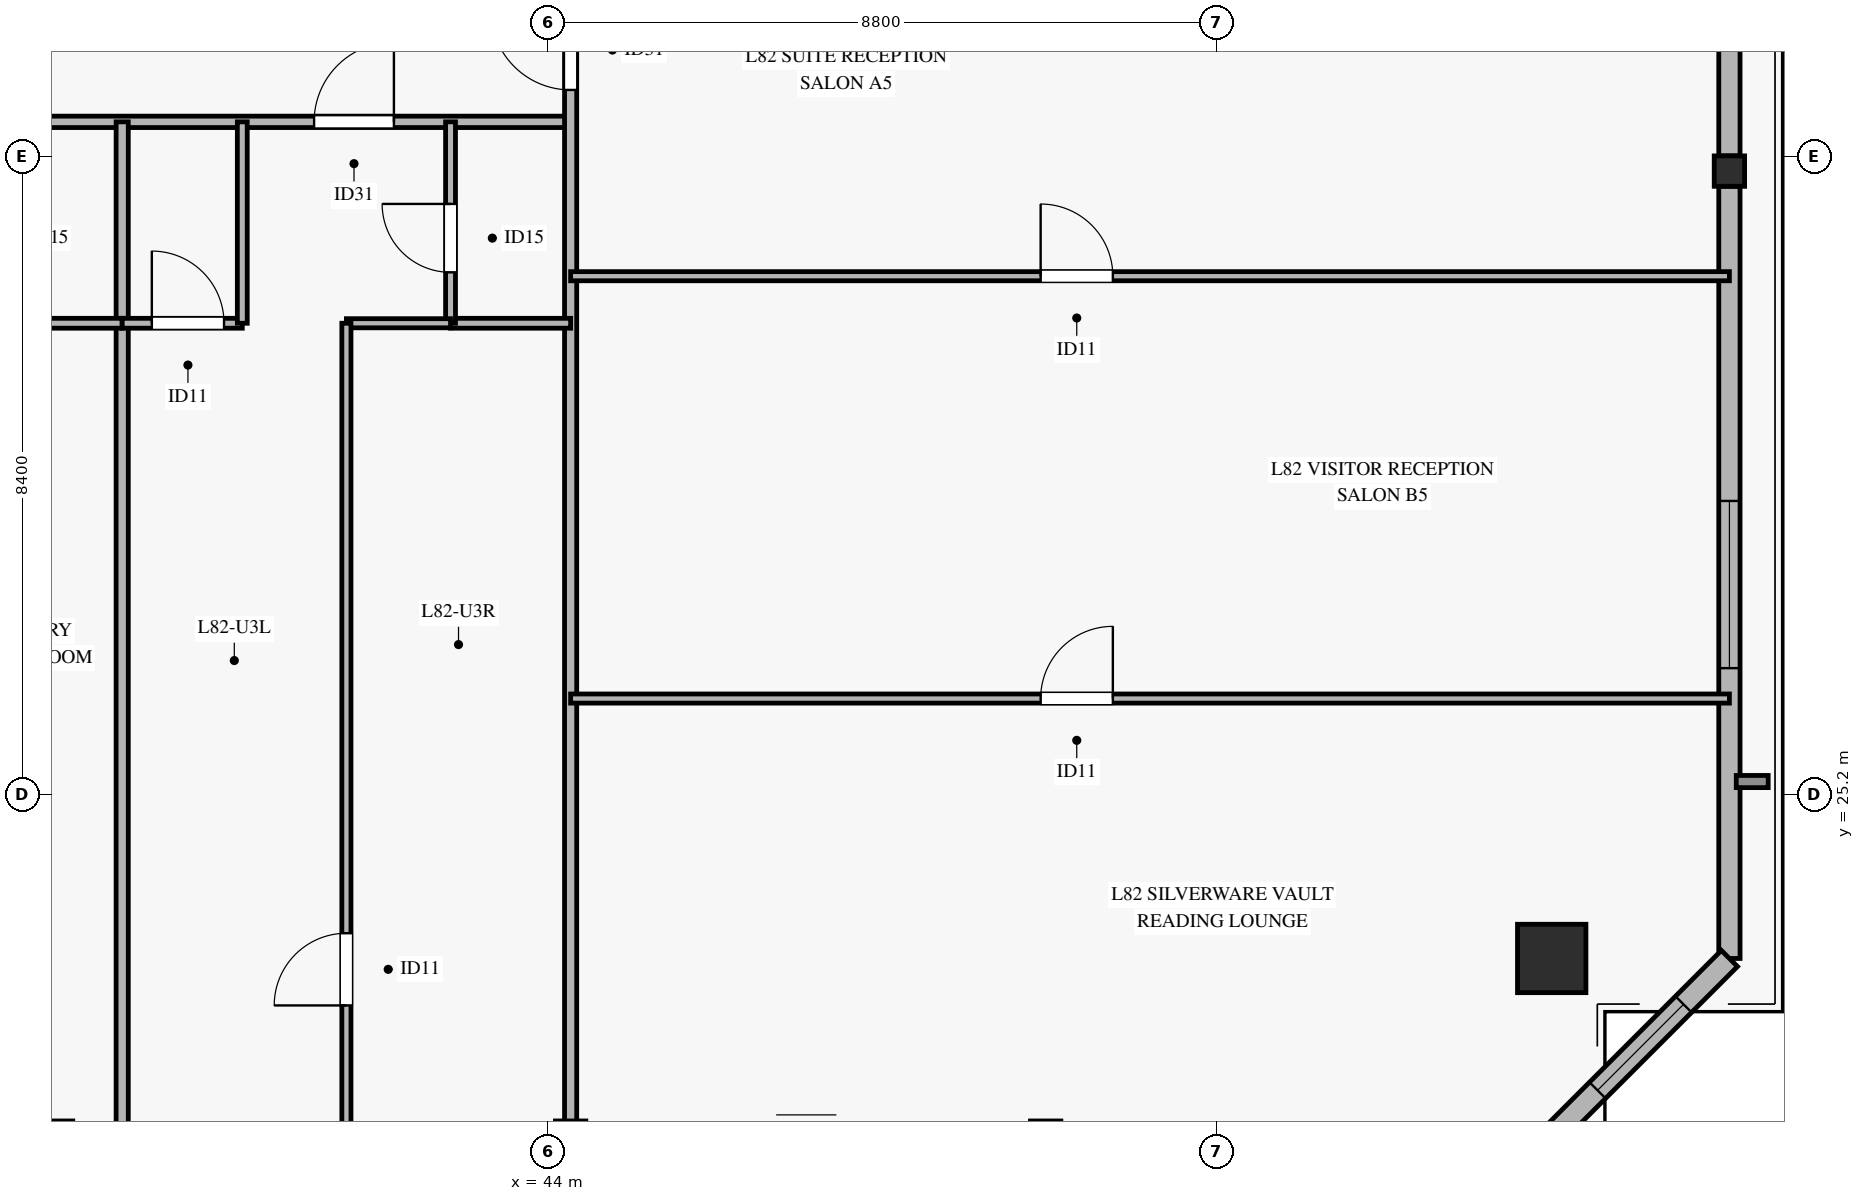
"""IFC4 building model, lengths in metres.
Left out: names, types, materials, properties, quantities, classifications, styles, units other than length and angle.
Written with IfcOpenShell. Run it as: python <this file> out.ifc"""

import sys

from ifc_helpers import new_model, si_unit, direction, frame, frame_2d, origin, origin_2d, place, context, subcontext, project, spatial, rectangle, hollow_rectangle, extrude, source, transform, mapped, element, fill, save


model = new_model("IFC4")
c1 = context("Model", 3, precision=1e-05, world=origin(), true_north=direction((0.0, 1.0)))
c2 = subcontext(c1, "Body", "Model", "MODEL_VIEW")
j1 = project(units=[si_unit("LENGTHUNIT", "METRE"), si_unit("PLANEANGLEUNIT", "RADIAN")], contexts=[c1])
p1 = place(None, origin())
s1 = spatial("IfcSite", under=j1, at=p1, CompositionType="ELEMENT")
p2 = place(p1, origin())
s2 = spatial("IfcBuilding", under=s1, at=p2, CompositionType="ELEMENT")
p3 = place(p2, frame((0.0, 0.0, 317.6)))
s3 = spatial("IfcBuildingStorey", under=s2, at=p3, CompositionType="ELEMENT", Elevation=317.6)
m1 = source(origin(), c2, "Body", "SweptSolid", [
    extrude(hollow_rectangle(XDim=0.9, YDim=0.9, WallThickness=0.04, at=origin_2d()), origin(), (0.0, 0.0, 1.0), 3.185),
])
p4 = place(p3, frame((57.208, 23.042, 0.0), z_axis=(0.0, 0.0, 1.0), x_axis=(1.0, 0.0, 0.0)))
e1 = element("IfcColumn", 1, at=p4, inside=s3, PredefinedType="COLUMN", context=c2, shape_type="MappedRepresentation", body=[
    mapped(m1, transform((0.0, 0.0, 0.0), x_axis=(1.0, 0.0, 0.0), y_axis=(0.0, 1.0, 0.0), z_axis=(0.0, 0.0, 1.0), scale=1.0)),
])
m2 = source(origin(), c2, "Body", "SweptSolid", [
    extrude(hollow_rectangle(XDim=0.4, YDim=0.4, WallThickness=0.02, at=origin_2d()), origin(), (0.0, 0.0, 1.0), 3.185),
])
p5 = place(p3, frame((59.546, 33.402, 0.0), z_axis=(0.0, 0.0, 1.0), x_axis=(1.0, 0.0, 0.0)))
e2 = element("IfcColumn", 2, at=p5, inside=s3, PredefinedType="COLUMN", context=c2, shape_type="MappedRepresentation", body=[
    mapped(m2, transform((0.0, 0.0, 0.0), x_axis=(1.0, 0.0, 0.0), y_axis=(0.0, 1.0, 0.0), z_axis=(0.0, 0.0, 1.0), scale=1.0)),
])
p6 = place(p3, frame((59.546, 23.042, 0.0), z_axis=(0.0, 0.0, 1.0), x_axis=(0.0, 1.0, 0.0)))
e3 = element("IfcWall", 3, at=p6, inside=s3, PredefinedType="SOLIDWALL", context=c2, shape_type="SweptSolid", body=[
    extrude(rectangle(XDim=10.16, YDim=0.28, at=frame_2d((5.08, 0.0))), origin(), (0.0, 0.0, 1.0), 2.815),
])
p7 = place(p6, frame((3.82, 0.0, 0.45)))
e4 = element("IfcOpeningElement", 4, at=p7, cuts=e3, PredefinedType="OPENING", context=c2, shape_type="SweptSolid", body=[
    extrude(rectangle(XDim=2.2, YDim=2.1, at=frame_2d((1.1, 1.05))), frame((0.0, 0.15, 0.0), z_axis=(0.0, -1.0, 0.0), x_axis=(1.0, 0.0, 0.0)), (0.0, 0.0, 1.0), 0.3),
])
p8 = place(p3, frame((59.546, 33.602, 0.0), z_axis=(0.0, 0.0, 1.0), x_axis=(0.0, 1.0, 0.0)))
e5 = element("IfcWall", 5, at=p8, inside=s3, PredefinedType="SOLIDWALL", context=c2, shape_type="SweptSolid", body=[
    extrude(rectangle(XDim=10.16, YDim=0.28, at=frame_2d((5.08, 0.0))), origin(), (0.0, 0.0, 1.0), 2.815),
])
p9 = place(p8, frame((5.955, 0.0, 0.45)))
e6 = element("IfcOpeningElement", 6, at=p9, cuts=e5, PredefinedType="OPENING", context=c2, shape_type="SweptSolid", body=[
    extrude(rectangle(XDim=2.2, YDim=2.1, at=frame_2d((1.1, 1.05))), frame((0.0, 0.15, 0.0), z_axis=(0.0, -1.0, 0.0), x_axis=(1.0, 0.0, 0.0)), (0.0, 0.0, 1.0), 0.3),
])
p10 = place(p3, frame((57.208, 20.704, 0.0), z_axis=(0.0, 0.0, 1.0), x_axis=(0.707106781187, 0.707106781187, 0.0)))
e7 = element("IfcWall", 7, at=p10, inside=s3, PredefinedType="SOLIDWALL", context=c2, shape_type="SweptSolid", body=[
    extrude(rectangle(XDim=3.306, YDim=0.3, at=frame_2d((1.653, 0.0))), origin(), (0.0, 0.0, 1.0), 2.815),
])
p11 = place(p10, frame((0.853, 0.0, 0.45)))
e8 = element("IfcOpeningElement", 8, at=p11, cuts=e7, PredefinedType="OPENING", context=c2, shape_type="SweptSolid", body=[
    extrude(rectangle(XDim=1.6, YDim=2.0, at=frame_2d((0.8, 1.0))), frame((0.0, 0.16, 0.0), z_axis=(0.0, -1.0, 0.0), x_axis=(1.0, 0.0, 0.0)), (0.0, 0.0, 1.0), 0.32),
])
p12 = place(p3, frame((23.4, 34.05, 0.0), z_axis=(0.0, 0.0, 1.0), x_axis=(1.0, 0.0, 0.0)))
e9 = element("IfcWall", 9, at=p12, inside=s3, PredefinedType="PARTITIONING", context=c2, shape_type="SweptSolid", body=[
    extrude(rectangle(XDim=20.9, YDim=0.15, at=frame_2d((10.45, 0.0))), origin(), (0.0, 0.0, 1.0), 2.47),
])
p13 = place(p12, frame((3.275, 0.0, 0.0)))
e10 = element("IfcOpeningElement", 10, at=p13, cuts=e9, PredefinedType="OPENING", context=c2, shape_type="SweptSolid", body=[
    extrude(rectangle(XDim=1.05, YDim=2.15, at=frame_2d((0.525, 1.075))), frame((0.0, 0.085, 0.0), z_axis=(0.0, -1.0, 0.0), x_axis=(1.0, 0.0, 0.0)), (0.0, 0.0, 1.0), 0.17),
])
p14 = place(p12, frame((10.775, 0.0, 0.0)))
e11 = element("IfcOpeningElement", 11, at=p14, cuts=e9, PredefinedType="OPENING", context=c2, shape_type="SweptSolid", body=[
    extrude(rectangle(XDim=1.05, YDim=2.15, at=frame_2d((0.525, 1.075))), frame((0.0, 0.085, 0.0), z_axis=(0.0, -1.0, 0.0), x_axis=(1.0, 0.0, 0.0)), (0.0, 0.0, 1.0), 0.17),
])
p15 = place(p12, frame((17.525, 0.0, 0.0)))
e12 = element("IfcOpeningElement", 12, at=p15, cuts=e9, PredefinedType="OPENING", context=c2, shape_type="SweptSolid", body=[
    extrude(rectangle(XDim=1.05, YDim=2.15, at=frame_2d((0.525, 1.075))), frame((0.0, 0.085, 0.0), z_axis=(0.0, -1.0, 0.0), x_axis=(1.0, 0.0, 0.0)), (0.0, 0.0, 1.0), 0.17),
])
p16 = place(p3, frame((38.4, 20.704, 0.0), z_axis=(0.0, 0.0, 1.0), x_axis=(0.0, 1.0, 0.0)))
e13 = element("IfcWall", 13, at=p16, inside=s3, PredefinedType="PARTITIONING", context=c2, shape_type="SweptSolid", body=[
    extrude(rectangle(XDim=13.346, YDim=0.16, at=frame_2d((6.673, 0.0))), origin(), (0.0, 0.0, 1.0), 2.77),
])
p17 = place(p3, frame((44.3, 20.704, 0.0), z_axis=(0.0, 0.0, 1.0), x_axis=(0.0, 1.0, 0.0)))
e14 = element("IfcWall", 14, at=p17, inside=s3, PredefinedType="PARTITIONING", context=c2, shape_type="SweptSolid", body=[
    extrude(rectangle(XDim=16.746, YDim=0.16, at=frame_2d((8.373, 0.0))), origin(), (0.0, 0.0, 1.0), 2.47),
])
p18 = place(p17, frame((13.766, 0.0, 0.0)))
e15 = element("IfcOpeningElement", 15, at=p18, cuts=e14, PredefinedType="OPENING", context=c2, shape_type="SweptSolid", body=[
    extrude(rectangle(XDim=1.05, YDim=2.15, at=frame_2d((0.525, 1.075))), frame((0.0, 0.09, 0.0), z_axis=(0.0, -1.0, 0.0), x_axis=(1.0, 0.0, 0.0)), (0.0, 0.0, 1.0), 0.18),
])
p19 = place(p3, frame((36.46, 31.4, 0.0), z_axis=(0.0, 0.0, 1.0), x_axis=(1.0, 0.0, 0.0)))
e16 = element("IfcWall", 16, at=p19, inside=s3, PredefinedType="PARTITIONING", context=c2, shape_type="SweptSolid", body=[
    extrude(rectangle(XDim=1.94, YDim=0.13, at=frame_2d((0.97, 0.0))), origin(), (0.0, 0.0, 1.0), 2.47),
])
p20 = place(p3, frame((38.4, 31.4, 0.0), z_axis=(0.0, 0.0, 1.0), x_axis=(1.0, 0.0, 0.0)))
e17 = element("IfcWall", 17, at=p20, inside=s3, PredefinedType="PARTITIONING", context=c2, shape_type="SweptSolid", body=[
    extrude(rectangle(XDim=1.58, YDim=0.13, at=frame_2d((0.79, 0.0))), origin(), (0.0, 0.0, 1.0), 3.185),
])
p21 = place(p20, frame((0.39, 0.0, 0.0)))
e18 = element("IfcOpeningElement", 18, at=p21, cuts=e17, PredefinedType="OPENING", context=c2, shape_type="SweptSolid", body=[
    extrude(rectangle(XDim=0.95, YDim=2.1, at=frame_2d((0.475, 1.05))), frame((0.0, 0.075, 0.0), z_axis=(0.0, -1.0, 0.0), x_axis=(1.0, 0.0, 0.0)), (0.0, 0.0, 1.0), 0.15),
])
p22 = place(p3, frame((39.98, 31.4, 0.0), z_axis=(0.0, 0.0, 1.0), x_axis=(0.0, 1.0, 0.0)))
e19 = element("IfcWall", 19, at=p22, inside=s3, PredefinedType="PARTITIONING", context=c2, shape_type="SweptSolid", body=[
    extrude(rectangle(XDim=2.65, YDim=0.13, at=frame_2d((1.325, 0.0))), origin(), (0.0, 0.0, 1.0), 2.77),
])
p23 = place(p3, frame((42.72, 31.4, 0.0), z_axis=(0.0, 0.0, 1.0), x_axis=(1.0, 0.0, 0.0)))
e20 = element("IfcWall", 20, at=p23, inside=s3, PredefinedType="PARTITIONING", context=c2, shape_type="SweptSolid", body=[
    extrude(rectangle(XDim=1.58, YDim=0.13, at=frame_2d((0.79, 0.0))), origin(), (0.0, 0.0, 1.0), 2.47),
])
p24 = place(p3, frame((42.72, 31.4, 0.0), z_axis=(0.0, 0.0, 1.0), x_axis=(0.0, 1.0, 0.0)))
e21 = element("IfcWall", 21, at=p24, inside=s3, PredefinedType="PARTITIONING", context=c2, shape_type="SweptSolid", body=[
    extrude(rectangle(XDim=2.65, YDim=0.13, at=frame_2d((1.325, 0.0))), origin(), (0.0, 0.0, 1.0), 2.77),
])
p25 = place(p24, frame((0.67, 0.0, 0.0)))
e22 = element("IfcOpeningElement", 22, at=p25, cuts=e21, PredefinedType="OPENING", context=c2, shape_type="SweptSolid", body=[
    extrude(rectangle(XDim=0.9, YDim=2.1, at=frame_2d((0.45, 1.05))), frame((0.0, 0.075, 0.0), z_axis=(0.0, -1.0, 0.0), x_axis=(1.0, 0.0, 0.0)), (0.0, 0.0, 1.0), 0.15),
])
p26 = place(p3, frame((41.35, 31.4, 0.0), z_axis=(0.0, 0.0, 1.0), x_axis=(1.0, 0.0, 0.0)))
e23 = element("IfcWall", 23, at=p26, inside=s3, PredefinedType="PARTITIONING", context=c2, shape_type="SweptSolid", body=[
    extrude(rectangle(XDim=1.37, YDim=0.12, at=frame_2d((0.685, 0.0))), origin(), (0.0, 0.0, 1.0), 3.185),
])
p27 = place(p3, frame((41.35, 20.704, 0.0), z_axis=(0.0, 0.0, 1.0), x_axis=(0.0, 1.0, 0.0)))
e24 = element("IfcWall", 24, at=p27, inside=s3, PredefinedType="PARTITIONING", context=c2, shape_type="SweptSolid", body=[
    extrude(rectangle(XDim=10.696, YDim=0.12, at=frame_2d((5.348, 0.0))), origin(), (0.0, 0.0, 1.0), 2.77),
])
p28 = place(p27, frame((1.72, 0.0, 0.0)))
e25 = element("IfcOpeningElement", 25, at=p28, cuts=e24, PredefinedType="OPENING", context=c2, shape_type="SweptSolid", body=[
    extrude(rectangle(XDim=0.95, YDim=2.1, at=frame_2d((0.475, 1.05))), frame((0.0, 0.07, 0.0), z_axis=(0.0, -1.0, 0.0), x_axis=(1.0, 0.0, 0.0)), (0.0, 0.0, 1.0), 0.14),
])
p29 = place(p3, frame((44.3, 26.462, 0.0), z_axis=(0.0, 0.0, 1.0), x_axis=(1.0, 0.0, 0.0)))
e26 = element("IfcWall", 26, at=p29, inside=s3, PredefinedType="PARTITIONING", context=c2, shape_type="SweptSolid", body=[
    extrude(rectangle(XDim=15.246, YDim=0.12, at=frame_2d((7.623, 0.0))), origin(), (0.0, 0.0, 1.0), 2.47),
])
p30 = place(p29, frame((6.184, 0.0, 0.0)))
e27 = element("IfcOpeningElement", 27, at=p30, cuts=e26, PredefinedType="OPENING", context=c2, shape_type="SweptSolid", body=[
    extrude(rectangle(XDim=0.95, YDim=2.1, at=frame_2d((0.475, 1.05))), frame((0.0, 0.07, 0.0), z_axis=(0.0, -1.0, 0.0), x_axis=(1.0, 0.0, 0.0)), (0.0, 0.0, 1.0), 0.14),
])
p31 = place(p3, frame((44.3, 32.019, 0.0), z_axis=(0.0, 0.0, 1.0), x_axis=(1.0, 0.0, 0.0)))
e28 = element("IfcWall", 28, at=p31, inside=s3, PredefinedType="PARTITIONING", context=c2, shape_type="SweptSolid", body=[
    extrude(rectangle(XDim=15.246, YDim=0.12, at=frame_2d((7.623, 0.0))), origin(), (0.0, 0.0, 1.0), 2.47),
])
p32 = place(p31, frame((6.184, 0.0, 0.0)))
e29 = element("IfcOpeningElement", 29, at=p32, cuts=e28, PredefinedType="OPENING", context=c2, shape_type="SweptSolid", body=[
    extrude(rectangle(XDim=0.95, YDim=2.1, at=frame_2d((0.475, 1.05))), frame((0.0, 0.07, 0.0), z_axis=(0.0, -1.0, 0.0), x_axis=(1.0, 0.0, 0.0)), (0.0, 0.0, 1.0), 0.14),
])
m3 = source(origin(), c2, "Body", "SweptSolid", [
    extrude(rectangle(XDim=2.2, YDim=2.1, at=frame_2d((1.1, 1.05))), frame((0.0, 0.03, 0.0), z_axis=(0.0, -1.0, 0.0), x_axis=(1.0, 0.0, 0.0)), (0.0, 0.0, 1.0), 0.06),
])
p33 = place(p7, origin())
e30 = element("IfcWindow", 30, at=p33, inside=s3, PartitioningType="SINGLE_PANEL", PredefinedType="WINDOW", context=c2, shape_type="MappedRepresentation", body=[
    mapped(m3, transform((0.0, 0.0, 0.0), x_axis=(1.0, 0.0, 0.0), y_axis=(0.0, 1.0, 0.0), z_axis=(0.0, 0.0, 1.0), scale=1.0)),
])
fill(e4, e30)
m4 = source(origin(), c2, "Body", "SweptSolid", [
    extrude(rectangle(XDim=1.6, YDim=2.0, at=frame_2d((0.8, 1.0))), frame((0.0, 0.03, 0.0), z_axis=(0.0, -1.0, 0.0), x_axis=(1.0, 0.0, 0.0)), (0.0, 0.0, 1.0), 0.06),
])
p34 = place(p11, origin())
e31 = element("IfcWindow", 31, at=p34, inside=s3, PartitioningType="SINGLE_PANEL", PredefinedType="WINDOW", context=c2, shape_type="MappedRepresentation", body=[
    mapped(m4, transform((0.0, 0.0, 0.0), x_axis=(1.0, 0.0, 0.0), y_axis=(0.0, 1.0, 0.0), z_axis=(0.0, 0.0, 1.0), scale=1.0)),
])
fill(e8, e31)
m5 = source(origin(), c2, "Body", "SweptSolid", [
    extrude(rectangle(XDim=1.05, YDim=2.15, at=frame_2d((0.525, 1.075))), frame((0.0, 0.025, 0.0), z_axis=(0.0, -1.0, 0.0), x_axis=(1.0, 0.0, 0.0)), (0.0, 0.0, 1.0), 0.05),
])
p35 = place(p15, origin())
e32 = element("IfcDoor", 32, at=p35, inside=s3, OperationType="SINGLE_SWING_RIGHT", PredefinedType="DOOR", context=c2, shape_type="MappedRepresentation", body=[
    mapped(m5, transform((0.0, 0.0, 0.0), x_axis=(1.0, 0.0, 0.0), y_axis=(0.0, 1.0, 0.0), z_axis=(0.0, 0.0, 1.0), scale=1.0)),
])
fill(e12, e32)
m6 = source(origin(), c2, "Body", "SweptSolid", [
    extrude(rectangle(XDim=0.95, YDim=2.1, at=frame_2d((0.475, 1.05))), frame((0.0, 0.025, 0.0), z_axis=(0.0, -1.0, 0.0), x_axis=(1.0, 0.0, 0.0)), (0.0, 0.0, 1.0), 0.05),
])
p36 = place(p21, origin())
e33 = element("IfcDoor", 33, at=p36, inside=s3, OperationType="SINGLE_SWING_LEFT", PredefinedType="DOOR", context=c2, shape_type="MappedRepresentation", body=[
    mapped(m6, transform((0.0, 0.0, 0.0), x_axis=(1.0, 0.0, 0.0), y_axis=(0.0, 1.0, 0.0), z_axis=(0.0, 0.0, 1.0), scale=1.0)),
])
fill(e18, e33)
m7 = source(origin(), c2, "Body", "SweptSolid", [
    extrude(rectangle(XDim=0.9, YDim=2.1, at=frame_2d((0.45, 1.05))), frame((0.0, 0.025, 0.0), z_axis=(0.0, -1.0, 0.0), x_axis=(1.0, 0.0, 0.0)), (0.0, 0.0, 1.0), 0.05),
])
p37 = place(p25, origin())
e34 = element("IfcDoor", 34, at=p37, inside=s3, OperationType="SINGLE_SWING_RIGHT", PredefinedType="DOOR", context=c2, shape_type="MappedRepresentation", body=[
    mapped(m7, transform((0.0, 0.0, 0.0), x_axis=(1.0, 0.0, 0.0), y_axis=(0.0, 1.0, 0.0), z_axis=(0.0, 0.0, 1.0), scale=1.0)),
])
fill(e22, e34)
p38 = place(p28, origin())
e35 = element("IfcDoor", 35, at=p38, inside=s3, OperationType="SINGLE_SWING_LEFT", PredefinedType="DOOR", context=c2, shape_type="MappedRepresentation", body=[
    mapped(m6, transform((0.0, 0.0, 0.0), x_axis=(1.0, 0.0, 0.0), y_axis=(0.0, 1.0, 0.0), z_axis=(0.0, 0.0, 1.0), scale=1.0)),
])
fill(e25, e35)
p39 = place(p18, origin())
e36 = element("IfcDoor", 36, at=p39, inside=s3, OperationType="SINGLE_SWING_RIGHT", PredefinedType="DOOR", context=c2, shape_type="MappedRepresentation", body=[
    mapped(m5, transform((0.0, 0.0, 0.0), x_axis=(1.0, 0.0, 0.0), y_axis=(0.0, 1.0, 0.0), z_axis=(0.0, 0.0, 1.0), scale=1.0)),
])
fill(e15, e36)
p40 = place(p32, origin())
e37 = element("IfcDoor", 37, at=p40, inside=s3, OperationType="SINGLE_SWING_LEFT", PredefinedType="DOOR", context=c2, shape_type="MappedRepresentation", body=[
    mapped(m6, transform((0.0, 0.0, 0.0), x_axis=(1.0, 0.0, 0.0), y_axis=(0.0, 1.0, 0.0), z_axis=(0.0, 0.0, 1.0), scale=1.0)),
])
fill(e29, e37)
p41 = place(p30, origin())
e38 = element("IfcDoor", 38, at=p41, inside=s3, OperationType="SINGLE_SWING_RIGHT", PredefinedType="DOOR", context=c2, shape_type="MappedRepresentation", body=[
    mapped(m6, transform((0.0, 0.0, 0.0), x_axis=(1.0, 0.0, 0.0), y_axis=(0.0, 1.0, 0.0), z_axis=(0.0, 0.0, 1.0), scale=1.0)),
])
fill(e27, e38)
save(model, sys.argv[1])
